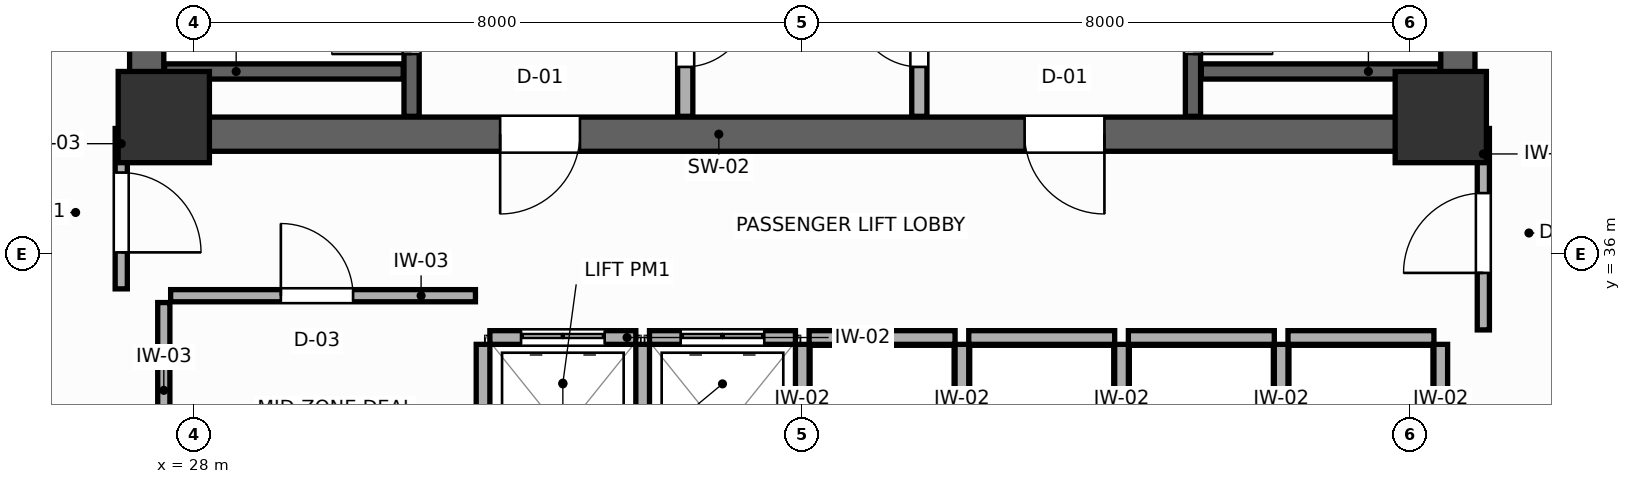
"""IFC4 building model, lengths in metres.
Left out: names, types, materials, properties, quantities, classifications, styles, units other than length and angle.
Written with IfcOpenShell. Run it as: python <this file> out.ifc"""

import sys

from ifc_helpers import new_model, si_unit, direction, frame, frame_2d, origin, origin_2d, place, context, subcontext, project, spatial, rectangle, extrude, source, transform, mapped, element, fill, save


model = new_model("IFC4")
c1 = context("Model", 3, precision=1e-05, world=origin(), true_north=direction((0.0, 1.0)))
c2 = subcontext(c1, "Body", "Model", "MODEL_VIEW")
j1 = project(units=[si_unit("LENGTHUNIT", "METRE"), si_unit("PLANEANGLEUNIT", "RADIAN")], contexts=[c1])
p1 = place(None, origin())
s1 = spatial("IfcSite", under=j1, at=p1, CompositionType="ELEMENT")
p2 = place(p1, origin())
s2 = spatial("IfcBuilding", under=s1, at=p2, CompositionType="ELEMENT")
p3 = place(p2, frame((0.0, 0.0, 165.0)))
s3 = spatial("IfcBuildingStorey", under=s2, at=p3, CompositionType="ELEMENT", Elevation=165.0)
p4 = place(p3, frame((27.15, 37.575, 0.0), z_axis=(0.0, 0.0, 1.0), x_axis=(1.0, 0.0, 0.0)))
e1 = element("IfcWall", 1, at=p4, inside=s3, PredefinedType="SHEAR", context=c2, shape_type="SweptSolid", body=[
    extrude(rectangle(XDim=17.7, YDim=0.45, at=frame_2d((8.85, 0.0))), origin(), (0.0, 0.0, 1.0), 3.6),
])
p5 = place(p4, frame((4.875, 0.0, 0.0)))
e2 = element("IfcOpeningElement", 2, at=p5, cuts=e1, PredefinedType="OPENING", context=c2, shape_type="SweptSolid", body=[
    extrude(rectangle(XDim=1.05, YDim=2.1, at=frame_2d((0.525, 1.05))), frame((0.0, 0.235, 0.0), z_axis=(0.0, -1.0, 0.0), x_axis=(1.0, 0.0, 0.0)), (0.0, 0.0, 1.0), 0.47),
])
p6 = place(p4, frame((11.775, 0.0, 0.0)))
e3 = element("IfcOpeningElement", 3, at=p6, cuts=e1, PredefinedType="OPENING", context=c2, shape_type="SweptSolid", body=[
    extrude(rectangle(XDim=1.05, YDim=2.1, at=frame_2d((0.525, 1.05))), frame((0.0, 0.235, 0.0), z_axis=(0.0, -1.0, 0.0), x_axis=(1.0, 0.0, 0.0)), (0.0, 0.0, 1.0), 0.47),
])
for number, where, z_axis, x_axis in (
    (4, (27.375, 37.8, 0.0), (0.0, 0.0, 1.0), (0.0, 1.0, 0.0)),
    (5, (44.625, 37.8, 0.0), (0.0, 0.0, 1.0), (0.0, 1.0, 0.0)),
):
    element("IfcWall", number, at=place(p3, frame(where, z_axis=z_axis, x_axis=x_axis)), inside=s3, PredefinedType="SHEAR", context=c2, shape_type="SweptSolid", body=[
        extrude(rectangle(XDim=9.0, YDim=0.45, at=frame_2d((4.5, 0.0))), origin(), (0.0, 0.0, 1.0), 3.6),
    ])
m1 = source(origin(), c2, "Body", "SweptSolid", [
    extrude(rectangle(XDim=1.2, YDim=1.2, at=origin_2d()), origin(), (0.0, 0.0, 1.0), 3.6),
])
for number, where, z_axis, x_axis in (
    (6, (27.6, 37.8, 0.0), (0.0, 0.0, 1.0), (1.0, 0.0, 0.0)),
    (7, (44.4, 37.8, 0.0), (0.0, 0.0, 1.0), (1.0, 0.0, 0.0)),
):
    element("IfcColumn", number, at=place(p3, frame(where, z_axis=z_axis, x_axis=x_axis)), inside=s3, PredefinedType="COLUMN", context=c2, shape_type="MappedRepresentation", body=[
        mapped(m1, transform((0.0, 0.0, 0.0), scale=1.0)),
    ])
p7 = place(p3, frame((30.86, 37.81, 0.0), z_axis=(0.0, 0.0, 1.0), x_axis=(0.0, 1.0, 0.0)))
e8 = element("IfcWall", 8, at=p7, inside=s3, PredefinedType="SHEAR", context=c2, shape_type="SweptSolid", body=[
    extrude(rectangle(XDim=8.98, YDim=0.2, at=frame_2d((4.49, 0.0))), origin(), (0.0, 0.0, 1.0), 3.6),
])
p8 = place(p7, frame((0.82, 0.0, 0.0)))
e9 = element("IfcOpeningElement", 9, at=p8, cuts=e8, PredefinedType="OPENING", context=c2, shape_type="SweptSolid", body=[
    extrude(rectangle(XDim=1.05, YDim=2.1, at=frame_2d((0.525, 1.05))), frame((0.0, 0.11, 0.0), z_axis=(0.0, -1.0, 0.0), x_axis=(1.0, 0.0, 0.0)), (0.0, 0.0, 1.0), 0.22),
])
p9 = place(p3, frame((27.61, 38.4, 0.0), z_axis=(0.0, 0.0, 1.0), x_axis=(1.0, 0.0, 0.0)))
e10 = element("IfcWall", 10, at=p9, inside=s3, PredefinedType="SHEAR", context=c2, shape_type="SweptSolid", body=[
    extrude(rectangle(XDim=3.14, YDim=0.2, at=frame_2d((1.57, 0.0))), origin(), (0.0, 0.0, 1.0), 3.6),
])
p10 = place(p3, frame((41.14, 37.81, 0.0), z_axis=(0.0, 0.0, 1.0), x_axis=(0.0, 1.0, 0.0)))
e11 = element("IfcWall", 11, at=p10, inside=s3, PredefinedType="SHEAR", context=c2, shape_type="SweptSolid", body=[
    extrude(rectangle(XDim=8.98, YDim=0.2, at=frame_2d((4.49, 0.0))), origin(), (0.0, 0.0, 1.0), 3.6),
])
p11 = place(p10, frame((0.82, 0.0, 0.0)))
e12 = element("IfcOpeningElement", 12, at=p11, cuts=e11, PredefinedType="OPENING", context=c2, shape_type="SweptSolid", body=[
    extrude(rectangle(XDim=1.05, YDim=2.1, at=frame_2d((0.525, 1.05))), frame((0.0, 0.11, 0.0), z_axis=(0.0, -1.0, 0.0), x_axis=(1.0, 0.0, 0.0)), (0.0, 0.0, 1.0), 0.22),
])
p12 = place(p3, frame((41.25, 38.4, 0.0), z_axis=(0.0, 0.0, 1.0), x_axis=(1.0, 0.0, 0.0)))
e13 = element("IfcWall", 13, at=p12, inside=s3, PredefinedType="SHEAR", context=c2, shape_type="SweptSolid", body=[
    extrude(rectangle(XDim=3.14, YDim=0.2, at=frame_2d((1.57, 0.0))), origin(), (0.0, 0.0, 1.0), 3.6),
])
p13 = place(p3, frame((34.46, 37.81, 0.0), z_axis=(0.0, 0.0, 1.0), x_axis=(0.0, 1.0, 0.0)))
e14 = element("IfcWall", 14, at=p13, inside=s3, PredefinedType="PARTITIONING", context=c2, shape_type="SweptSolid", body=[
    extrude(rectangle(XDim=8.98, YDim=0.2, at=frame_2d((4.49, 0.0))), origin(), (0.0, 0.0, 1.0), 3.4),
])
p14 = place(p13, frame((0.65, 0.0, 0.0)))
e15 = element("IfcOpeningElement", 15, at=p14, cuts=e14, PredefinedType="OPENING", context=c2, shape_type="SweptSolid", body=[
    extrude(rectangle(XDim=0.85, YDim=2.05, at=frame_2d((0.425, 1.025))), frame((0.0, 0.11, 0.0), z_axis=(0.0, -1.0, 0.0), x_axis=(1.0, 0.0, 0.0)), (0.0, 0.0, 1.0), 0.22),
])
p15 = place(p3, frame((37.54, 37.81, 0.0), z_axis=(0.0, 0.0, 1.0), x_axis=(0.0, 1.0, 0.0)))
e16 = element("IfcWall", 16, at=p15, inside=s3, PredefinedType="PARTITIONING", context=c2, shape_type="SweptSolid", body=[
    extrude(rectangle(XDim=8.98, YDim=0.2, at=frame_2d((4.49, 0.0))), origin(), (0.0, 0.0, 1.0), 3.4),
])
p16 = place(p15, frame((0.65, 0.0, 0.0)))
e17 = element("IfcOpeningElement", 17, at=p16, cuts=e16, PredefinedType="OPENING", context=c2, shape_type="SweptSolid", body=[
    extrude(rectangle(XDim=0.85, YDim=2.05, at=frame_2d((0.425, 1.025))), frame((0.0, 0.11, 0.0), z_axis=(0.0, -1.0, 0.0), x_axis=(1.0, 0.0, 0.0)), (0.0, 0.0, 1.0), 0.22),
])
p17 = place(p3, frame((31.89, 34.9, 0.0), z_axis=(0.0, 0.0, 1.0), x_axis=(1.0, 0.0, 0.0)))
e18 = element("IfcWall", 18, at=p17, inside=s3, PredefinedType="PARTITIONING", context=c2, shape_type="SweptSolid", body=[
    extrude(rectangle(XDim=1.92, YDim=0.18, at=frame_2d((0.96, 0.0))), origin(), (0.0, 0.0, 1.0), 3.4),
])
p18 = place(p17, frame((0.41, 0.0, 0.0)))
e19 = element("IfcOpeningElement", 19, at=p18, cuts=e18, PredefinedType="OPENING", context=c2, shape_type="SweptSolid", body=[
    extrude(rectangle(XDim=1.1, YDim=2.1, at=frame_2d((0.55, 1.05))), frame((0.0, 0.1, 0.0), z_axis=(0.0, -1.0, 0.0), x_axis=(1.0, 0.0, 0.0)), (0.0, 0.0, 1.0), 0.2),
])
p19 = place(p3, frame((31.8, 32.49, 0.0), z_axis=(0.0, 0.0, 1.0), x_axis=(0.0, 1.0, 0.0)))
e20 = element("IfcWall", 20, at=p19, inside=s3, PredefinedType="PARTITIONING", context=c2, shape_type="SweptSolid", body=[
    extrude(rectangle(XDim=2.32, YDim=0.18, at=frame_2d((1.16, 0.0))), origin(), (0.0, 0.0, 1.0), 3.4),
])
p20 = place(p3, frame((33.99, 34.9, 0.0), z_axis=(0.0, 0.0, 1.0), x_axis=(1.0, 0.0, 0.0)))
e21 = element("IfcWall", 21, at=p20, inside=s3, PredefinedType="PARTITIONING", context=c2, shape_type="SweptSolid", body=[
    extrude(rectangle(XDim=1.92, YDim=0.18, at=frame_2d((0.96, 0.0))), origin(), (0.0, 0.0, 1.0), 3.4),
])
p21 = place(p20, frame((0.41, 0.0, 0.0)))
e22 = element("IfcOpeningElement", 22, at=p21, cuts=e21, PredefinedType="OPENING", context=c2, shape_type="SweptSolid", body=[
    extrude(rectangle(XDim=1.1, YDim=2.1, at=frame_2d((0.55, 1.05))), frame((0.0, 0.1, 0.0), z_axis=(0.0, -1.0, 0.0), x_axis=(1.0, 0.0, 0.0)), (0.0, 0.0, 1.0), 0.2),
])
p22 = place(p3, frame((33.9, 32.49, 0.0), z_axis=(0.0, 0.0, 1.0), x_axis=(0.0, 1.0, 0.0)))
e23 = element("IfcWall", 23, at=p22, inside=s3, PredefinedType="PARTITIONING", context=c2, shape_type="SweptSolid", body=[
    extrude(rectangle(XDim=2.32, YDim=0.18, at=frame_2d((1.16, 0.0))), origin(), (0.0, 0.0, 1.0), 3.4),
])
p23 = place(p3, frame((36.09, 34.9, 0.0), z_axis=(0.0, 0.0, 1.0), x_axis=(1.0, 0.0, 0.0)))
e24 = element("IfcWall", 24, at=p23, inside=s3, PredefinedType="PARTITIONING", context=c2, shape_type="SweptSolid", body=[
    extrude(rectangle(XDim=1.92, YDim=0.18, at=frame_2d((0.96, 0.0))), origin(), (0.0, 0.0, 1.0), 3.4),
])
p24 = place(p3, frame((36.0, 32.49, 0.0), z_axis=(0.0, 0.0, 1.0), x_axis=(0.0, 1.0, 0.0)))
e25 = element("IfcWall", 25, at=p24, inside=s3, PredefinedType="PARTITIONING", context=c2, shape_type="SweptSolid", body=[
    extrude(rectangle(XDim=2.32, YDim=0.18, at=frame_2d((1.16, 0.0))), origin(), (0.0, 0.0, 1.0), 3.4),
])
p25 = place(p3, frame((38.19, 34.9, 0.0), z_axis=(0.0, 0.0, 1.0), x_axis=(1.0, 0.0, 0.0)))
e26 = element("IfcWall", 26, at=p25, inside=s3, PredefinedType="PARTITIONING", context=c2, shape_type="SweptSolid", body=[
    extrude(rectangle(XDim=1.92, YDim=0.18, at=frame_2d((0.96, 0.0))), origin(), (0.0, 0.0, 1.0), 3.4),
])
p26 = place(p3, frame((38.1, 32.49, 0.0), z_axis=(0.0, 0.0, 1.0), x_axis=(0.0, 1.0, 0.0)))
e27 = element("IfcWall", 27, at=p26, inside=s3, PredefinedType="PARTITIONING", context=c2, shape_type="SweptSolid", body=[
    extrude(rectangle(XDim=2.32, YDim=0.18, at=frame_2d((1.16, 0.0))), origin(), (0.0, 0.0, 1.0), 3.4),
])
p27 = place(p3, frame((40.29, 34.9, 0.0), z_axis=(0.0, 0.0, 1.0), x_axis=(1.0, 0.0, 0.0)))
e28 = element("IfcWall", 28, at=p27, inside=s3, PredefinedType="PARTITIONING", context=c2, shape_type="SweptSolid", body=[
    extrude(rectangle(XDim=1.92, YDim=0.18, at=frame_2d((0.96, 0.0))), origin(), (0.0, 0.0, 1.0), 3.4),
])
p28 = place(p3, frame((40.2, 32.49, 0.0), z_axis=(0.0, 0.0, 1.0), x_axis=(0.0, 1.0, 0.0)))
e29 = element("IfcWall", 29, at=p28, inside=s3, PredefinedType="PARTITIONING", context=c2, shape_type="SweptSolid", body=[
    extrude(rectangle(XDim=2.32, YDim=0.18, at=frame_2d((1.16, 0.0))), origin(), (0.0, 0.0, 1.0), 3.4),
])
p29 = place(p3, frame((42.39, 34.9, 0.0), z_axis=(0.0, 0.0, 1.0), x_axis=(1.0, 0.0, 0.0)))
e30 = element("IfcWall", 30, at=p29, inside=s3, PredefinedType="PARTITIONING", context=c2, shape_type="SweptSolid", body=[
    extrude(rectangle(XDim=1.92, YDim=0.18, at=frame_2d((0.96, 0.0))), origin(), (0.0, 0.0, 1.0), 3.4),
])
for number, where, z_axis, x_axis in (
    (31, (42.3, 32.49, 0.0), (0.0, 0.0, 1.0), (0.0, 1.0, 0.0)),
    (32, (44.4, 32.49, 0.0), (0.0, 0.0, 1.0), (0.0, 1.0, 0.0)),
):
    element("IfcWall", number, at=place(p3, frame(where, z_axis=z_axis, x_axis=x_axis)), inside=s3, PredefinedType="PARTITIONING", context=c2, shape_type="SweptSolid", body=[
        extrude(rectangle(XDim=2.32, YDim=0.18, at=frame_2d((1.16, 0.0))), origin(), (0.0, 0.0, 1.0), 3.4),
    ])
p30 = place(p3, frame((27.6, 33.05, 0.0), z_axis=(0.0, 0.0, 1.0), x_axis=(0.0, 1.0, 0.0)))
e33 = element("IfcWall", 33, at=p30, inside=s3, PredefinedType="PARTITIONING", context=c2, shape_type="SweptSolid", body=[
    extrude(rectangle(XDim=2.31, YDim=0.16, at=frame_2d((1.155, 0.0))), origin(), (0.0, 0.0, 1.0), 3.4),
])
p31 = place(p3, frame((27.69, 35.45, 0.0), z_axis=(0.0, 0.0, 1.0), x_axis=(1.0, 0.0, 0.0)))
e34 = element("IfcWall", 34, at=p31, inside=s3, PredefinedType="PARTITIONING", context=c2, shape_type="SweptSolid", body=[
    extrude(rectangle(XDim=4.01, YDim=0.16, at=frame_2d((2.005, 0.0))), origin(), (0.0, 0.0, 1.0), 3.4),
])
p32 = place(p31, frame((1.45, 0.0, 0.0)))
e35 = element("IfcOpeningElement", 35, at=p32, cuts=e34, PredefinedType="OPENING", context=c2, shape_type="SweptSolid", body=[
    extrude(rectangle(XDim=0.95, YDim=2.05, at=frame_2d((0.475, 1.025))), frame((0.0, 0.09, 0.0), z_axis=(0.0, -1.0, 0.0), x_axis=(1.0, 0.0, 0.0)), (0.0, 0.0, 1.0), 0.18),
])
p33 = place(p3, frame((27.04, 35.54, 0.0), z_axis=(0.0, 0.0, 1.0), x_axis=(0.0, 1.0, 0.0)))
e36 = element("IfcWall", 36, at=p33, inside=s3, PredefinedType="PARTITIONING", context=c2, shape_type="SweptSolid", body=[
    extrude(rectangle(XDim=2.11, YDim=0.16, at=frame_2d((1.055, 0.0))), origin(), (0.0, 0.0, 1.0), 3.4),
])
p34 = place(p33, frame((0.48, 0.0, 0.0)))
e37 = element("IfcOpeningElement", 37, at=p34, cuts=e36, PredefinedType="OPENING", context=c2, shape_type="SweptSolid", body=[
    extrude(rectangle(XDim=1.05, YDim=2.1, at=frame_2d((0.525, 1.05))), frame((0.0, 0.09, 0.0), z_axis=(0.0, -1.0, 0.0), x_axis=(1.0, 0.0, 0.0)), (0.0, 0.0, 1.0), 0.18),
])
p35 = place(p3, frame((44.96, 35.0, 0.0), z_axis=(0.0, 0.0, 1.0), x_axis=(0.0, 1.0, 0.0)))
e38 = element("IfcWall", 38, at=p35, inside=s3, PredefinedType="PARTITIONING", context=c2, shape_type="SweptSolid", body=[
    extrude(rectangle(XDim=2.65, YDim=0.16, at=frame_2d((1.325, 0.0))), origin(), (0.0, 0.0, 1.0), 3.4),
])
p36 = place(p35, frame((0.75, 0.0, 0.0)))
e39 = element("IfcOpeningElement", 39, at=p36, cuts=e38, PredefinedType="OPENING", context=c2, shape_type="SweptSolid", body=[
    extrude(rectangle(XDim=1.05, YDim=2.1, at=frame_2d((0.525, 1.05))), frame((0.0, 0.09, 0.0), z_axis=(0.0, -1.0, 0.0), x_axis=(1.0, 0.0, 0.0)), (0.0, 0.0, 1.0), 0.18),
])
p37 = place(p8, origin())
e40 = element("IfcDoor", 40, at=p37, inside=s3, OperationType="SINGLE_SWING_LEFT", PredefinedType="DOOR", context=c2, shape_type="SweptSolid", body=[
    extrude(rectangle(XDim=1.05, YDim=2.1, at=frame_2d((0.525, 1.05))), frame((0.0, 0.025, 0.0), z_axis=(0.0, -1.0, 0.0), x_axis=(1.0, 0.0, 0.0)), (0.0, 0.0, 1.0), 0.05),
])
fill(e9, e40)
p38 = place(p11, frame((1.05, 0.0, 0.0), z_axis=(0.0, 0.0, 1.0), x_axis=(-1.0, 0.0, 0.0)))
e41 = element("IfcDoor", 41, at=p38, inside=s3, OperationType="SINGLE_SWING_RIGHT", PredefinedType="DOOR", context=c2, shape_type="SweptSolid", body=[
    extrude(rectangle(XDim=1.05, YDim=2.1, at=frame_2d((0.525, 1.05))), frame((0.0, 0.025, 0.0), z_axis=(0.0, -1.0, 0.0), x_axis=(1.0, 0.0, 0.0)), (0.0, 0.0, 1.0), 0.05),
])
fill(e12, e41)
p39 = place(p14, frame((0.85, 0.0, 0.0), z_axis=(0.0, 0.0, 1.0), x_axis=(-1.0, 0.0, 0.0)))
e42 = element("IfcDoor", 42, at=p39, inside=s3, OperationType="SINGLE_SWING_LEFT", PredefinedType="DOOR", context=c2, shape_type="SweptSolid", body=[
    extrude(rectangle(XDim=0.85, YDim=2.05, at=frame_2d((0.425, 1.025))), frame((0.0, 0.025, 0.0), z_axis=(0.0, -1.0, 0.0), x_axis=(1.0, 0.0, 0.0)), (0.0, 0.0, 1.0), 0.05),
])
fill(e15, e42)
p40 = place(p16, origin())
e43 = element("IfcDoor", 43, at=p40, inside=s3, OperationType="SINGLE_SWING_RIGHT", PredefinedType="DOOR", context=c2, shape_type="SweptSolid", body=[
    extrude(rectangle(XDim=0.85, YDim=2.05, at=frame_2d((0.425, 1.025))), frame((0.0, 0.025, 0.0), z_axis=(0.0, -1.0, 0.0), x_axis=(1.0, 0.0, 0.0)), (0.0, 0.0, 1.0), 0.05),
])
fill(e17, e43)
p41 = place(p18, origin())
e44 = element("IfcDoor", 44, at=p41, inside=s3, OperationType="DOUBLE_DOOR_SLIDING", PredefinedType="DOOR", context=c2, shape_type="SweptSolid", body=[
    extrude(rectangle(XDim=1.1, YDim=2.1, at=frame_2d((0.55, 1.05))), frame((0.0, 0.025, 0.0), z_axis=(0.0, -1.0, 0.0), x_axis=(1.0, 0.0, 0.0)), (0.0, 0.0, 1.0), 0.05),
])
fill(e19, e44)
p42 = place(p21, origin())
e45 = element("IfcDoor", 45, at=p42, inside=s3, OperationType="DOUBLE_DOOR_SLIDING", PredefinedType="DOOR", context=c2, shape_type="SweptSolid", body=[
    extrude(rectangle(XDim=1.1, YDim=2.1, at=frame_2d((0.55, 1.05))), frame((0.0, 0.025, 0.0), z_axis=(0.0, -1.0, 0.0), x_axis=(1.0, 0.0, 0.0)), (0.0, 0.0, 1.0), 0.05),
])
fill(e22, e45)
p43 = place(p32, origin())
e46 = element("IfcDoor", 46, at=p43, inside=s3, OperationType="SINGLE_SWING_LEFT", PredefinedType="DOOR", context=c2, shape_type="SweptSolid", body=[
    extrude(rectangle(XDim=0.95, YDim=2.05, at=frame_2d((0.475, 1.025))), frame((0.0, 0.025, 0.0), z_axis=(0.0, -1.0, 0.0), x_axis=(1.0, 0.0, 0.0)), (0.0, 0.0, 1.0), 0.05),
])
fill(e35, e46)
p44 = place(p34, frame((1.05, 0.0, 0.0), z_axis=(0.0, 0.0, 1.0), x_axis=(-1.0, 0.0, 0.0)))
e47 = element("IfcDoor", 47, at=p44, inside=s3, OperationType="SINGLE_SWING_RIGHT", PredefinedType="DOOR", context=c2, shape_type="SweptSolid", body=[
    extrude(rectangle(XDim=1.05, YDim=2.1, at=frame_2d((0.525, 1.05))), frame((0.0, 0.025, 0.0), z_axis=(0.0, -1.0, 0.0), x_axis=(1.0, 0.0, 0.0)), (0.0, 0.0, 1.0), 0.05),
])
fill(e37, e47)
p45 = place(p36, origin())
e48 = element("IfcDoor", 48, at=p45, inside=s3, OperationType="SINGLE_SWING_LEFT", PredefinedType="DOOR", context=c2, shape_type="SweptSolid", body=[
    extrude(rectangle(XDim=1.05, YDim=2.1, at=frame_2d((0.525, 1.05))), frame((0.0, 0.025, 0.0), z_axis=(0.0, -1.0, 0.0), x_axis=(1.0, 0.0, 0.0)), (0.0, 0.0, 1.0), 0.05),
])
fill(e39, e48)
p46 = place(p5, frame((1.05, 0.0, 0.0), z_axis=(0.0, 0.0, 1.0), x_axis=(-1.0, 0.0, 0.0)))
e49 = element("IfcDoor", 49, at=p46, inside=s3, OperationType="SINGLE_SWING_RIGHT", PredefinedType="DOOR", context=c2, shape_type="SweptSolid", body=[
    extrude(rectangle(XDim=1.05, YDim=2.1, at=frame_2d((0.525, 1.05))), frame((0.0, 0.025, 0.0), z_axis=(0.0, -1.0, 0.0), x_axis=(1.0, 0.0, 0.0)), (0.0, 0.0, 1.0), 0.05),
])
fill(e2, e49)
p47 = place(p6, frame((1.05, 0.0, 0.0), z_axis=(0.0, 0.0, 1.0), x_axis=(-1.0, 0.0, 0.0)))
e50 = element("IfcDoor", 50, at=p47, inside=s3, OperationType="SINGLE_SWING_LEFT", PredefinedType="DOOR", context=c2, shape_type="SweptSolid", body=[
    extrude(rectangle(XDim=1.05, YDim=2.1, at=frame_2d((0.525, 1.05))), frame((0.0, 0.025, 0.0), z_axis=(0.0, -1.0, 0.0), x_axis=(1.0, 0.0, 0.0)), (0.0, 0.0, 1.0), 0.05),
])
fill(e3, e50)
save(model, sys.argv[1])
